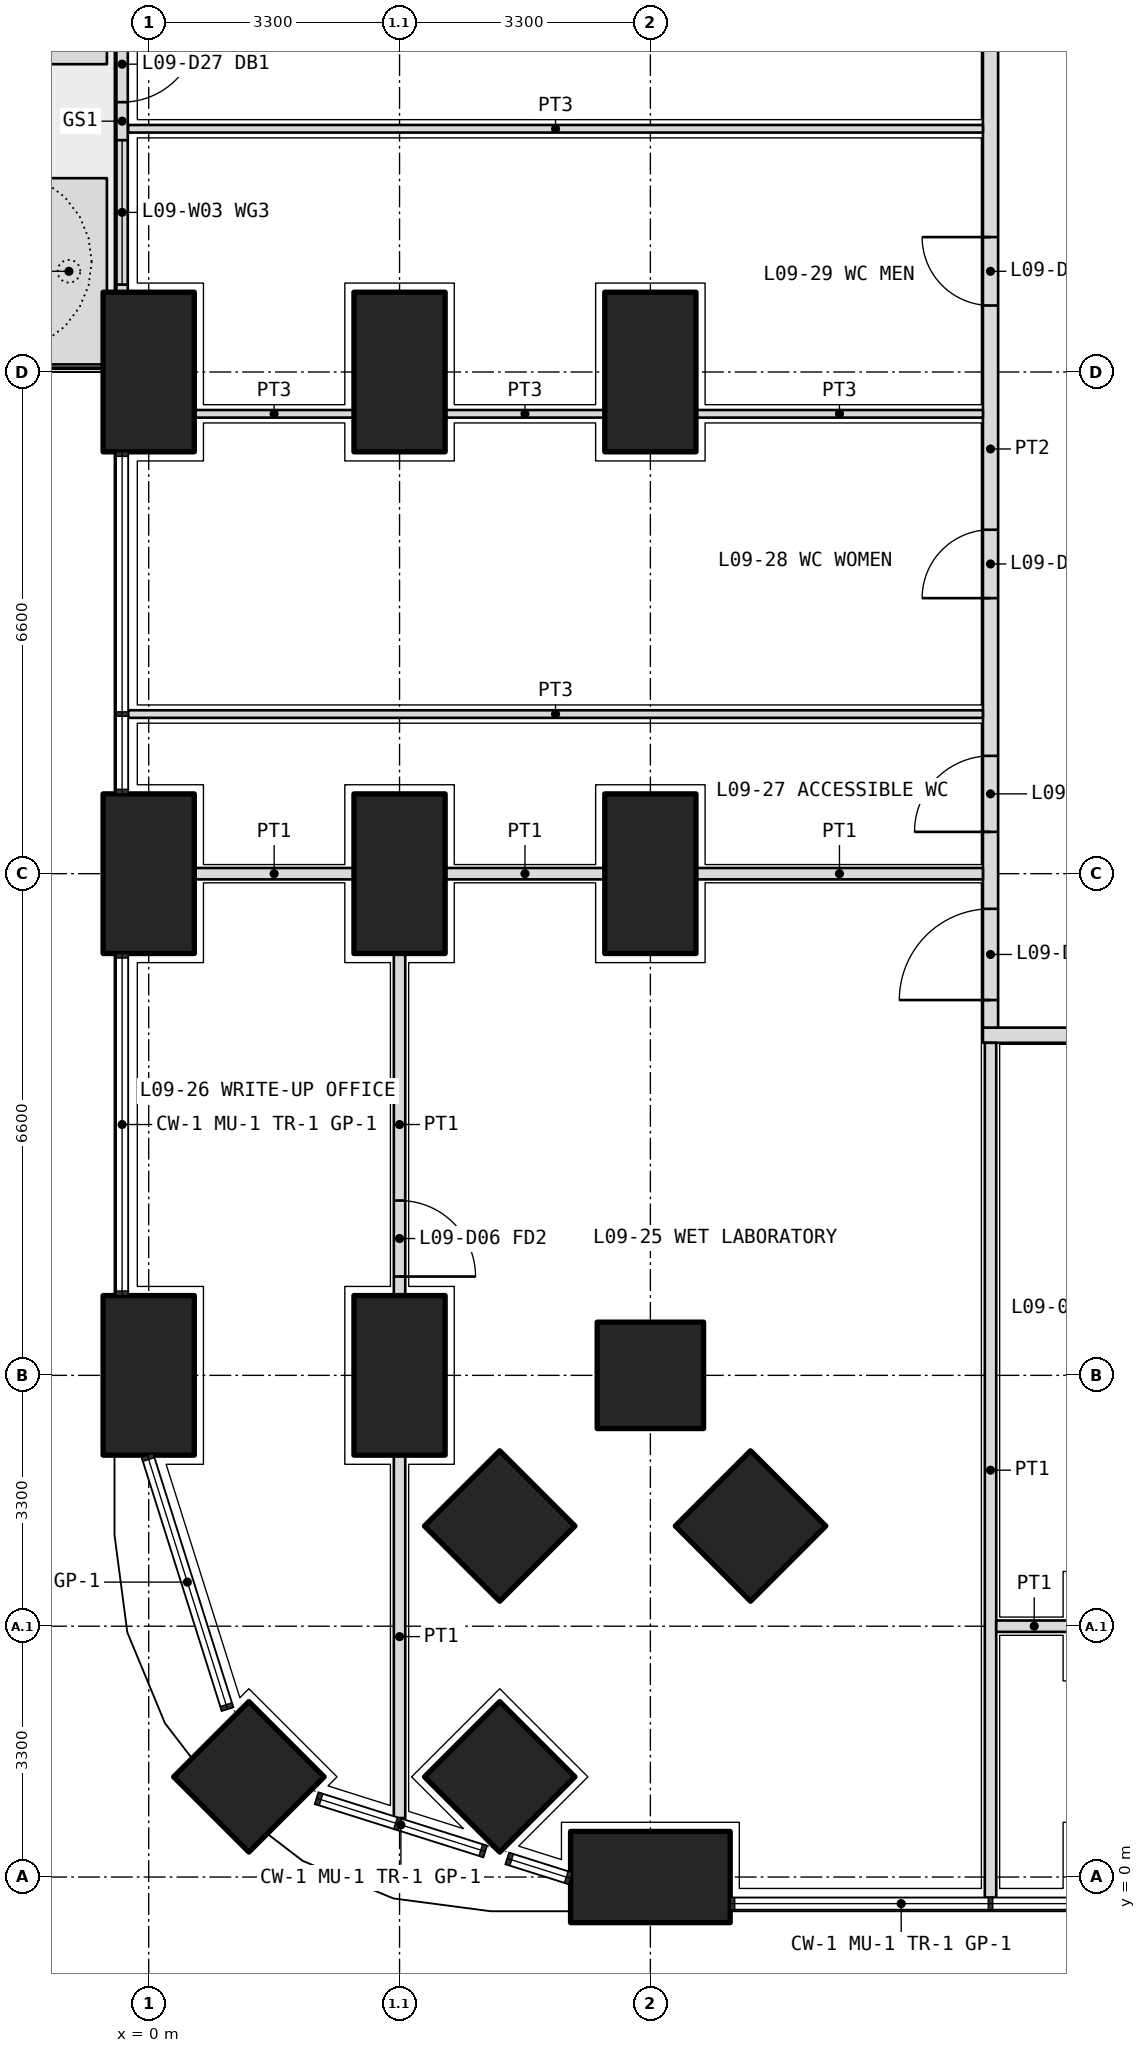
"""IFC4 building model, lengths in metres.
Left out: names, types, materials, properties, quantities, classifications, styles, units other than length and angle.
Written with IfcOpenShell. Run it as: python <this file> out.ifc"""

import sys

from ifc_helpers import new_model, si_unit, direction, frame, frame_2d, origin, origin_2d, place, context, subcontext, project, spatial, polyline, rectangle, outline, extrude, element, fill, save


model = new_model("IFC4")
c1 = context("Model", 3, precision=1e-05, world=origin(), true_north=direction((0.0, 1.0)))
c2 = subcontext(c1, "Body", "Model", "MODEL_VIEW")
j1 = project(units=[si_unit("LENGTHUNIT", "METRE"), si_unit("PLANEANGLEUNIT", "RADIAN")], contexts=[c1])
p1 = place(None, origin())
s1 = spatial("IfcSite", under=j1, at=p1, CompositionType="ELEMENT")
p2 = place(p1, origin())
s2 = spatial("IfcBuilding", under=s1, at=p2, CompositionType="ELEMENT")
p3 = place(p2, frame((0.0, 0.0, 42.3)))
s3 = spatial("IfcBuildingStorey", under=s2, at=p3, CompositionType="ELEMENT", Elevation=42.3)
p4 = place(p3, frame((1.318, 1.318, 0.0), z_axis=(0.0, 0.0, 1.0), x_axis=(0.707106781187, 0.707106781187, 0.0)))
e1 = element("IfcColumn", 1, at=p4, inside=s3, PredefinedType="COLUMN", context=c2, shape_type="SweptSolid", body=[
    extrude(rectangle(XDim=1.4, YDim=1.4, at=origin_2d()), origin(), (0.0, 0.0, 1.0), 4.2),
])
for number, where, z_axis, x_axis in (
    (2, (6.6, 0.0, 0.0), (0.0, 0.0, 1.0), (1.0, 0.0, 0.0)),
    (3, (0.0, 6.6, 0.0), (0.0, 0.0, 1.0), (0.0, 1.0, 0.0)),
    (4, (0.0, 13.2, 0.0), (0.0, 0.0, 1.0), (0.0, 1.0, 0.0)),
    (5, (0.0, 19.8, 0.0), (0.0, 0.0, 1.0), (0.0, 1.0, 0.0)),
):
    element("IfcColumn", number, at=place(p3, frame(where, z_axis=z_axis, x_axis=x_axis)), inside=s3, PredefinedType="COLUMN", context=c2, shape_type="SweptSolid", body=[
        extrude(rectangle(XDim=2.1, YDim=1.2, at=origin_2d()), origin(), (0.0, 0.0, 1.0), 4.2),
    ])
for number, where, z_axis, x_axis in (
    (6, (6.6, 6.6, 0.0), (0.0, 0.0, 1.0), (1.0, 0.0, 0.0)),
    (7, (4.618, 1.318, 0.0), (0.0, 0.0, 1.0), (0.707, 0.707, 0.0)),
):
    element("IfcColumn", number, at=place(p3, frame(where, z_axis=z_axis, x_axis=x_axis)), inside=s3, PredefinedType="COLUMN", context=c2, shape_type="SweptSolid", body=[
        extrude(rectangle(XDim=1.4, YDim=1.4, at=origin_2d()), origin(), (0.0, 0.0, 1.0), 4.2),
    ])
for number, where, z_axis, x_axis in (
    (8, (3.3, 6.6, 0.0), (0.0, 0.0, 1.0), (0.0, 1.0, 0.0)),
    (9, (3.3, 13.2, 0.0), (0.0, 0.0, 1.0), (0.0, 1.0, 0.0)),
    (10, (3.3, 19.8, 0.0), (0.0, 0.0, 1.0), (0.0, 1.0, 0.0)),
):
    element("IfcColumn", number, at=place(p3, frame(where, z_axis=z_axis, x_axis=x_axis)), inside=s3, PredefinedType="COLUMN", context=c2, shape_type="SweptSolid", body=[
        extrude(rectangle(XDim=2.1, YDim=1.2, at=origin_2d()), origin(), (0.0, 0.0, 1.0), 4.2),
    ])
for number, where, z_axis, x_axis in (
    (11, (4.618, 4.618, 0.0), (0.0, 0.0, 1.0), (0.707, 0.707, 0.0)),
    (12, (7.918, 4.618, 0.0), (0.0, 0.0, 1.0), (0.707, 0.707, 0.0)),
):
    element("IfcColumn", number, at=place(p3, frame(where, z_axis=z_axis, x_axis=x_axis)), inside=s3, PredefinedType="COLUMN", context=c2, shape_type="SweptSolid", body=[
        extrude(rectangle(XDim=1.4, YDim=1.4, at=origin_2d()), origin(), (0.0, 0.0, 1.0), 4.2),
    ])
for number, where, z_axis, x_axis in (
    (13, (6.6, 13.2, 0.0), (0.0, 0.0, 1.0), (0.0, 1.0, 0.0)),
    (14, (6.6, 19.8, 0.0), (0.0, 0.0, 1.0), (0.0, 1.0, 0.0)),
):
    element("IfcColumn", number, at=place(p3, frame(where, z_axis=z_axis, x_axis=x_axis)), inside=s3, PredefinedType="COLUMN", context=c2, shape_type="SweptSolid", body=[
        extrude(rectangle(XDim=2.1, YDim=1.2, at=origin_2d()), origin(), (0.0, 0.0, 1.0), 4.2),
    ])
p5 = place(p3, origin())
e15 = element("IfcWall", 15, at=p5, inside=s3, PredefinedType="USERDEFINED", context=c2, shape_type="SweptSolid", body=[
    extrude(outline(polyline([(-1.55, 19.9), (-0.55, 19.9), (-0.55, 22.35), (-1.55, 22.35), (-1.55, 19.9)]), holes=[polyline([(-1.4, 20.05), (-0.7, 20.05), (-0.7, 22.2), (-1.4, 22.2), (-1.4, 20.05)])]), origin(), (0.0, 0.0, 1.0), 1.05),
])
p6 = place(p3, origin())
e16 = element("IfcWall", 16, at=p6, inside=s3, PredefinedType="USERDEFINED", context=c2, shape_type="SweptSolid", body=[
    extrude(outline(polyline([(-1.55, 23.85), (-0.55, 23.85), (-0.55, 32.9), (-1.55, 32.9), (-1.55, 23.85)]), holes=[polyline([(-1.4, 24.0), (-0.7, 24.0), (-0.7, 32.75), (-1.4, 32.75), (-1.4, 24.0)])]), origin(), (0.0, 0.0, 1.0), 1.05),
])
p7 = place(p3, frame((-0.35, 25.35, 0.0), z_axis=(0.0, 0.0, 1.0), x_axis=(0.0, -1.0, 0.0)))
e17 = element("IfcWall", 17, at=p7, inside=s3, PredefinedType="SOLIDWALL", context=c2, shape_type="SweptSolid", body=[
    extrude(rectangle(XDim=4.5, YDim=0.15, at=frame_2d((2.25, 0.0))), origin(), (0.0, 0.0, 1.0), 2.7),
])
p8 = place(p7, frame((1.0, 0.0, 0.0)))
e18 = element("IfcOpeningElement", 18, at=p8, cuts=e17, PredefinedType="OPENING", context=c2, shape_type="SweptSolid", body=[
    extrude(rectangle(XDim=1.0, YDim=2.4, at=frame_2d((0.5, 1.2))), frame((0.0, 0.085, 0.0), z_axis=(0.0, -1.0, 0.0), x_axis=(1.0, 0.0, 0.0)), (0.0, 0.0, 1.0), 0.17),
])
p9 = place(p7, frame((0.1, 0.0, 0.1)))
e19 = element("IfcOpeningElement", 19, at=p9, cuts=e17, PredefinedType="OPENING", context=c2, shape_type="SweptSolid", body=[
    extrude(rectangle(XDim=0.8, YDim=2.3, at=frame_2d((0.4, 1.15))), frame((0.0, 0.085, 0.0), z_axis=(0.0, -1.0, 0.0), x_axis=(1.0, 0.0, 0.0)), (0.0, 0.0, 1.0), 0.17),
])
p10 = place(p7, frame((2.5, 0.0, 0.1)))
e20 = element("IfcOpeningElement", 20, at=p10, cuts=e17, PredefinedType="OPENING", context=c2, shape_type="SweptSolid", body=[
    extrude(rectangle(XDim=1.9, YDim=2.3, at=frame_2d((0.95, 1.15))), frame((0.0, 0.085, 0.0), z_axis=(0.0, -1.0, 0.0), x_axis=(1.0, 0.0, 0.0)), (0.0, 0.0, 1.0), 0.17),
])
p11 = place(p3, frame((10.975, 11.075, 0.0), z_axis=(0.0, 0.0, 1.0), x_axis=(1.0, 0.0, 0.0)))
e21 = element("IfcWall", 21, at=p11, inside=s3, PredefinedType="PARTITIONING", context=c2, shape_type="SweptSolid", body=[
    extrude(rectangle(XDim=30.85, YDim=0.2, at=frame_2d((15.425, 0.0))), origin(), (0.0, 0.0, 1.0), 2.85),
])
p12 = place(p11, frame((2.312, 0.0, 0.0)))
e22 = element("IfcOpeningElement", 22, at=p12, cuts=e21, PredefinedType="OPENING", context=c2, shape_type="SweptSolid", body=[
    extrude(rectangle(XDim=1.0, YDim=2.1, at=frame_2d((0.5, 1.05))), frame((0.0, 0.11, 0.0), z_axis=(0.0, -1.0, 0.0), x_axis=(1.0, 0.0, 0.0)), (0.0, 0.0, 1.0), 0.22),
])
p13 = place(p11, frame((6.575, 0.0, 0.0)))
e23 = element("IfcOpeningElement", 23, at=p13, cuts=e21, PredefinedType="OPENING", context=c2, shape_type="SweptSolid", body=[
    extrude(rectangle(XDim=1.2, YDim=2.1, at=frame_2d((0.6, 1.05))), frame((0.0, 0.11, 0.0), z_axis=(0.0, -1.0, 0.0), x_axis=(1.0, 0.0, 0.0)), (0.0, 0.0, 1.0), 0.22),
])
p14 = place(p11, frame((13.275, 0.0, 0.0)))
e24 = element("IfcOpeningElement", 24, at=p14, cuts=e21, PredefinedType="OPENING", context=c2, shape_type="SweptSolid", body=[
    extrude(rectangle(XDim=1.0, YDim=2.1, at=frame_2d((0.5, 1.05))), frame((0.0, 0.11, 0.0), z_axis=(0.0, -1.0, 0.0), x_axis=(1.0, 0.0, 0.0)), (0.0, 0.0, 1.0), 0.22),
])
p15 = place(p11, frame((20.325, 0.0, 0.0)))
e25 = element("IfcOpeningElement", 25, at=p15, cuts=e21, PredefinedType="OPENING", context=c2, shape_type="SweptSolid", body=[
    extrude(rectangle(XDim=1.0, YDim=2.1, at=frame_2d((0.5, 1.05))), frame((0.0, 0.11, 0.0), z_axis=(0.0, -1.0, 0.0), x_axis=(1.0, 0.0, 0.0)), (0.0, 0.0, 1.0), 0.22),
])
p16 = place(p11, frame((23.625, 0.0, 0.0)))
e26 = element("IfcOpeningElement", 26, at=p16, cuts=e21, PredefinedType="OPENING", context=c2, shape_type="SweptSolid", body=[
    extrude(rectangle(XDim=1.0, YDim=2.1, at=frame_2d((0.5, 1.05))), frame((0.0, 0.11, 0.0), z_axis=(0.0, -1.0, 0.0), x_axis=(1.0, 0.0, 0.0)), (0.0, 0.0, 1.0), 0.22),
])
p17 = place(p11, frame((27.438, 0.0, 0.0)))
e27 = element("IfcOpeningElement", 27, at=p17, cuts=e21, PredefinedType="OPENING", context=c2, shape_type="SweptSolid", body=[
    extrude(rectangle(XDim=1.2, YDim=2.1, at=frame_2d((0.6, 1.05))), frame((0.0, 0.11, 0.0), z_axis=(0.0, -1.0, 0.0), x_axis=(1.0, 0.0, 0.0)), (0.0, 0.0, 1.0), 0.22),
])
p18 = place(p3, frame((11.075, 11.175, 0.0), z_axis=(0.0, 0.0, 1.0), x_axis=(0.0, 1.0, 0.0)))
e28 = element("IfcWall", 28, at=p18, inside=s3, PredefinedType="PARTITIONING", context=c2, shape_type="SweptSolid", body=[
    extrude(rectangle(XDim=15.225, YDim=0.2, at=frame_2d((7.612, 0.0))), origin(), (0.0, 0.0, 1.0), 2.85),
])
p19 = place(p18, frame((0.363, 0.0, 0.0)))
e29 = element("IfcOpeningElement", 29, at=p19, cuts=e28, PredefinedType="OPENING", context=c2, shape_type="SweptSolid", body=[
    extrude(rectangle(XDim=1.2, YDim=2.1, at=frame_2d((0.6, 1.05))), frame((0.0, 0.11, 0.0), z_axis=(0.0, -1.0, 0.0), x_axis=(1.0, 0.0, 0.0)), (0.0, 0.0, 1.0), 0.22),
])
p20 = place(p18, frame((2.575, 0.0, 0.0)))
e30 = element("IfcOpeningElement", 30, at=p20, cuts=e28, PredefinedType="OPENING", context=c2, shape_type="SweptSolid", body=[
    extrude(rectangle(XDim=1.0, YDim=2.1, at=frame_2d((0.5, 1.05))), frame((0.0, 0.11, 0.0), z_axis=(0.0, -1.0, 0.0), x_axis=(1.0, 0.0, 0.0)), (0.0, 0.0, 1.0), 0.22),
])
p21 = place(p18, frame((5.65, 0.0, 0.0)))
e31 = element("IfcOpeningElement", 31, at=p21, cuts=e28, PredefinedType="OPENING", context=c2, shape_type="SweptSolid", body=[
    extrude(rectangle(XDim=0.9, YDim=2.1, at=frame_2d((0.45, 1.05))), frame((0.0, 0.11, 0.0), z_axis=(0.0, -1.0, 0.0), x_axis=(1.0, 0.0, 0.0)), (0.0, 0.0, 1.0), 0.22),
])
p22 = place(p18, frame((9.5, 0.0, 0.0)))
e32 = element("IfcOpeningElement", 32, at=p22, cuts=e28, PredefinedType="OPENING", context=c2, shape_type="SweptSolid", body=[
    extrude(rectangle(XDim=0.9, YDim=2.1, at=frame_2d((0.45, 1.05))), frame((0.0, 0.11, 0.0), z_axis=(0.0, -1.0, 0.0), x_axis=(1.0, 0.0, 0.0)), (0.0, 0.0, 1.0), 0.22),
])
p23 = place(p18, frame((13.025, 0.0, 0.0)))
e33 = element("IfcOpeningElement", 33, at=p23, cuts=e28, PredefinedType="OPENING", context=c2, shape_type="SweptSolid", body=[
    extrude(rectangle(XDim=1.0, YDim=2.1, at=frame_2d((0.5, 1.05))), frame((0.0, 0.11, 0.0), z_axis=(0.0, -1.0, 0.0), x_axis=(1.0, 0.0, 0.0)), (0.0, 0.0, 1.0), 0.22),
])
p24 = place(p3, frame((11.075, -0.27, 0.0), z_axis=(0.0, 0.0, 1.0), x_axis=(0.0, 1.0, 0.0)))
e34 = element("IfcWall", 34, at=p24, inside=s3, PredefinedType="PARTITIONING", context=c2, shape_type="SweptSolid", body=[
    extrude(rectangle(XDim=11.245, YDim=0.15, at=frame_2d((5.623, 0.0))), origin(), (0.0, 0.0, 1.0), 2.7),
])
p25 = place(p3, frame((11.15, 3.3, 0.0), z_axis=(0.0, 0.0, 1.0), x_axis=(1.0, 0.0, 0.0)))
e35 = element("IfcWall", 35, at=p25, inside=s3, PredefinedType="PARTITIONING", context=c2, shape_type="SweptSolid", body=[
    extrude(rectangle(XDim=1.0, YDim=0.15, at=frame_2d((0.5, 0.0))), origin(), (0.0, 0.0, 1.0), 3.9),
])
p26 = place(p3, frame((3.3, 12.15, 0.0), z_axis=(0.0, 0.0, 1.0), x_axis=(0.0, -1.0, 0.0)))
e36 = element("IfcWall", 36, at=p26, inside=s3, PredefinedType="PARTITIONING", context=c2, shape_type="SweptSolid", body=[
    extrude(rectangle(XDim=4.5, YDim=0.15, at=frame_2d((2.25, 0.0))), origin(), (0.0, 0.0, 1.0), 3.9),
])
p27 = place(p26, frame((3.25, 0.0, 0.0)))
e37 = element("IfcOpeningElement", 37, at=p27, cuts=e36, PredefinedType="OPENING", context=c2, shape_type="SweptSolid", body=[
    extrude(rectangle(XDim=1.0, YDim=2.1, at=frame_2d((0.5, 1.05))), frame((0.0, 0.085, 0.0), z_axis=(0.0, -1.0, 0.0), x_axis=(1.0, 0.0, 0.0)), (0.0, 0.0, 1.0), 0.17),
])
p28 = place(p3, frame((3.3, 5.55, 0.0), z_axis=(0.0, 0.0, 1.0), x_axis=(0.0, -1.0, 0.0)))
e38 = element("IfcWall", 38, at=p28, inside=s3, PredefinedType="PARTITIONING", context=c2, shape_type="SweptSolid", body=[
    extrude(rectangle(XDim=4.774, YDim=0.15, at=frame_2d((2.387, 0.0))), origin(), (0.0, 0.0, 1.0), 2.7),
])
p29 = place(p3, frame((-0.27, 15.3, 0.0), z_axis=(0.0, 0.0, 1.0), x_axis=(1.0, 0.0, 0.0)))
e39 = element("IfcWall", 39, at=p29, inside=s3, PredefinedType="PARTITIONING", context=c2, shape_type="SweptSolid", body=[
    extrude(rectangle(XDim=11.245, YDim=0.1, at=frame_2d((5.623, 0.0))), origin(), (0.0, 0.0, 1.0), 2.7),
])
p30 = place(p3, frame((0.6, 19.25, 0.0), z_axis=(0.0, 0.0, 1.0), x_axis=(1.0, 0.0, 0.0)))
e40 = element("IfcWall", 40, at=p30, inside=s3, PredefinedType="PARTITIONING", context=c2, shape_type="SweptSolid", body=[
    extrude(rectangle(XDim=2.1, YDim=0.1, at=frame_2d((1.05, 0.0))), origin(), (0.0, 0.0, 1.0), 2.85),
])
p31 = place(p3, frame((3.9, 19.25, 0.0), z_axis=(0.0, 0.0, 1.0), x_axis=(1.0, 0.0, 0.0)))
e41 = element("IfcWall", 41, at=p31, inside=s3, PredefinedType="PARTITIONING", context=c2, shape_type="SweptSolid", body=[
    extrude(rectangle(XDim=2.1, YDim=0.1, at=frame_2d((1.05, 0.0))), origin(), (0.0, 0.0, 1.0), 2.85),
])
p32 = place(p3, frame((7.2, 19.25, 0.0), z_axis=(0.0, 0.0, 1.0), x_axis=(1.0, 0.0, 0.0)))
e42 = element("IfcWall", 42, at=p32, inside=s3, PredefinedType="PARTITIONING", context=c2, shape_type="SweptSolid", body=[
    extrude(rectangle(XDim=3.775, YDim=0.1, at=frame_2d((1.888, 0.0))), origin(), (0.0, 0.0, 1.0), 2.85),
])
p33 = place(p3, frame((-0.27, 23.0, 0.0), z_axis=(0.0, 0.0, 1.0), x_axis=(1.0, 0.0, 0.0)))
e43 = element("IfcWall", 43, at=p33, inside=s3, PredefinedType="PARTITIONING", context=c2, shape_type="SweptSolid", body=[
    extrude(rectangle(XDim=11.245, YDim=0.1, at=frame_2d((5.623, 0.0))), origin(), (0.0, 0.0, 1.0), 2.7),
])
p34 = place(p3, frame((0.6, 13.2, 0.0), z_axis=(0.0, 0.0, 1.0), x_axis=(1.0, 0.0, 0.0)))
e44 = element("IfcWall", 44, at=p34, inside=s3, PredefinedType="PARTITIONING", context=c2, shape_type="SweptSolid", body=[
    extrude(rectangle(XDim=2.1, YDim=0.15, at=frame_2d((1.05, 0.0))), origin(), (0.0, 0.0, 1.0), 2.85),
])
p35 = place(p3, frame((3.9, 13.2, 0.0), z_axis=(0.0, 0.0, 1.0), x_axis=(1.0, 0.0, 0.0)))
e45 = element("IfcWall", 45, at=p35, inside=s3, PredefinedType="PARTITIONING", context=c2, shape_type="SweptSolid", body=[
    extrude(rectangle(XDim=2.1, YDim=0.15, at=frame_2d((1.05, 0.0))), origin(), (0.0, 0.0, 1.0), 2.85),
])
p36 = place(p3, frame((7.2, 13.2, 0.0), z_axis=(0.0, 0.0, 1.0), x_axis=(1.0, 0.0, 0.0)))
e46 = element("IfcWall", 46, at=p36, inside=s3, PredefinedType="PARTITIONING", context=c2, shape_type="SweptSolid", body=[
    extrude(rectangle(XDim=3.775, YDim=0.15, at=frame_2d((1.888, 0.0))), origin(), (0.0, 0.0, 1.0), 2.85),
])
p37 = place(p8, origin())
e47 = element("IfcDoor", 47, at=p37, inside=s3, OperationType="SINGLE_SWING_LEFT", PredefinedType="DOOR", context=c2, shape_type="SweptSolid", body=[
    extrude(rectangle(XDim=1.0, YDim=2.4, at=frame_2d((0.5, 1.2))), frame((0.0, 0.025, 0.0), z_axis=(0.0, -1.0, 0.0), x_axis=(1.0, 0.0, 0.0)), (0.0, 0.0, 1.0), 0.05),
])
fill(e18, e47)
p38 = place(p10, origin())
e48 = element("IfcWindow", 48, at=p38, inside=s3, PartitioningType="SINGLE_PANEL", PredefinedType="WINDOW", context=c2, shape_type="SweptSolid", body=[
    extrude(rectangle(XDim=1.9, YDim=2.3, at=frame_2d((0.95, 1.15))), frame((0.0, 0.03, 0.0), z_axis=(0.0, -1.0, 0.0), x_axis=(1.0, 0.0, 0.0)), (0.0, 0.0, 1.0), 0.06),
])
fill(e20, e48)
p39 = place(p19, origin())
e49 = element("IfcDoor", 49, at=p39, inside=s3, OperationType="DOUBLE_DOOR_SINGLE_SWING", PredefinedType="DOOR", context=c2, shape_type="SweptSolid", body=[
    extrude(rectangle(XDim=1.2, YDim=2.1, at=frame_2d((0.6, 1.05))), frame((0.0, 0.025, 0.0), z_axis=(0.0, -1.0, 0.0), x_axis=(1.0, 0.0, 0.0)), (0.0, 0.0, 1.0), 0.05),
])
fill(e29, e49)
p40 = place(p27, origin())
e50 = element("IfcDoor", 50, at=p40, inside=s3, OperationType="SINGLE_SWING_RIGHT", PredefinedType="DOOR", context=c2, shape_type="SweptSolid", body=[
    extrude(rectangle(XDim=1.0, YDim=2.1, at=frame_2d((0.5, 1.05))), frame((0.0, 0.025, 0.0), z_axis=(0.0, -1.0, 0.0), x_axis=(1.0, 0.0, 0.0)), (0.0, 0.0, 1.0), 0.05),
])
fill(e37, e50)
p41 = place(p20, origin())
e51 = element("IfcDoor", 51, at=p41, inside=s3, OperationType="SINGLE_SWING_LEFT", PredefinedType="DOOR", context=c2, shape_type="SweptSolid", body=[
    extrude(rectangle(XDim=1.0, YDim=2.1, at=frame_2d((0.5, 1.05))), frame((0.0, 0.025, 0.0), z_axis=(0.0, -1.0, 0.0), x_axis=(1.0, 0.0, 0.0)), (0.0, 0.0, 1.0), 0.05),
])
fill(e30, e51)
p42 = place(p21, origin())
e52 = element("IfcDoor", 52, at=p42, inside=s3, OperationType="SINGLE_SWING_LEFT", PredefinedType="DOOR", context=c2, shape_type="SweptSolid", body=[
    extrude(rectangle(XDim=0.9, YDim=2.1, at=frame_2d((0.45, 1.05))), frame((0.0, 0.025, 0.0), z_axis=(0.0, -1.0, 0.0), x_axis=(1.0, 0.0, 0.0)), (0.0, 0.0, 1.0), 0.05),
])
fill(e31, e52)
p43 = place(p22, origin())
e53 = element("IfcDoor", 53, at=p43, inside=s3, OperationType="SINGLE_SWING_RIGHT", PredefinedType="DOOR", context=c2, shape_type="SweptSolid", body=[
    extrude(rectangle(XDim=0.9, YDim=2.1, at=frame_2d((0.45, 1.05))), frame((0.0, 0.025, 0.0), z_axis=(0.0, -1.0, 0.0), x_axis=(1.0, 0.0, 0.0)), (0.0, 0.0, 1.0), 0.05),
])
fill(e32, e53)
save(model, sys.argv[1])
